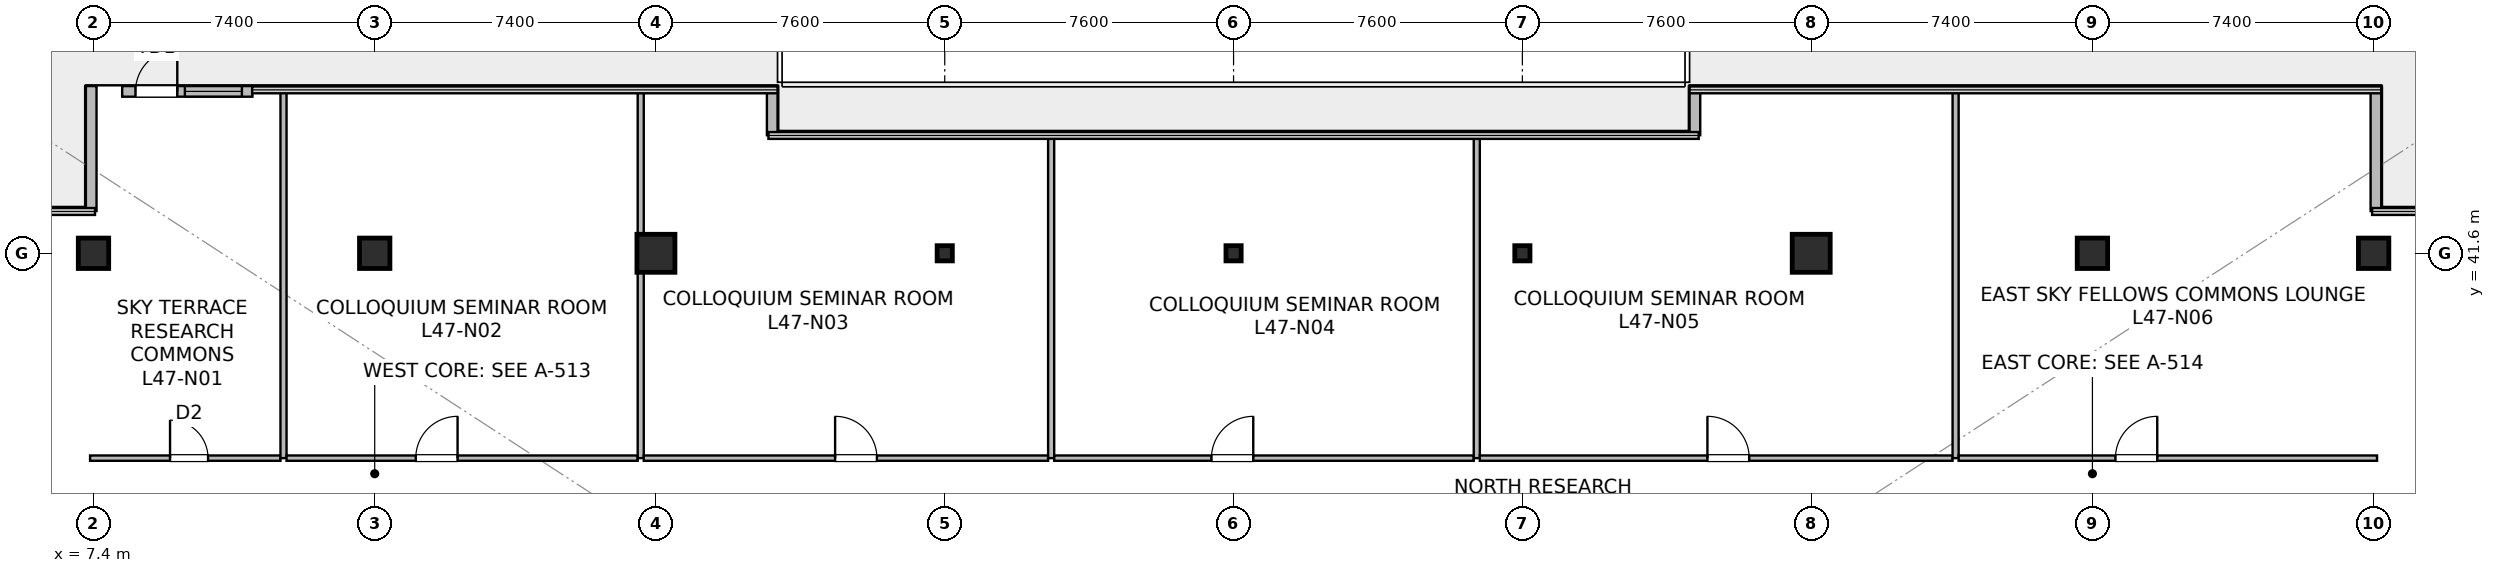
"""IFC4 building model, lengths in metres.
Left out: names, types, materials, properties, quantities, classifications, styles, units other than length and angle.
Written with IfcOpenShell. Run it as: python <this file> out.ifc"""

import sys

from ifc_helpers import new_model, si_unit, direction, frame, frame_2d, origin, origin_2d, place, context, subcontext, project, spatial, rectangle, hollow_rectangle, extrude, source, transform, mapped, element, fill, save


model = new_model("IFC4")
c1 = context("Model", 3, precision=1e-05, world=origin(), true_north=direction((0.0, 1.0)))
c2 = subcontext(c1, "Body", "Model", "MODEL_VIEW")
j1 = project(units=[si_unit("LENGTHUNIT", "METRE"), si_unit("PLANEANGLEUNIT", "RADIAN")], contexts=[c1])
p1 = place(None, origin())
s1 = spatial("IfcSite", under=j1, at=p1, CompositionType="ELEMENT")
p2 = place(p1, origin())
s2 = spatial("IfcBuilding", under=s1, at=p2, CompositionType="ELEMENT")
p3 = place(p2, frame((0.0, 0.0, 196.6)))
s3 = spatial("IfcBuildingStorey", under=s2, at=p3, CompositionType="ELEMENT", Elevation=196.6)
m1 = source(origin(), c2, "Body", "SweptSolid", [
    extrude(rectangle(XDim=0.8, YDim=0.8, at=origin_2d()), origin(), (0.0, 0.0, 1.0), 4.8),
])
p4 = place(p3, frame((14.8, 41.6, 0.0), z_axis=(0.0, 0.0, 1.0), x_axis=(1.0, 0.0, 0.0)))
e1 = element("IfcColumn", 1, at=p4, inside=s3, PredefinedType="COLUMN", context=c2, shape_type="MappedRepresentation", body=[
    mapped(m1, transform((0.0, 0.0, 0.0), scale=1.0)),
])
m2 = source(origin(), c2, "Body", "SweptSolid", [
    extrude(rectangle(XDim=1.0, YDim=1.0, at=origin_2d()), origin(), (0.0, 0.0, 1.0), 4.8),
])
for number, where, z_axis, x_axis in (
    (2, (22.2, 41.6, 0.0), (0.0, 0.0, 1.0), (1.0, 0.0, 0.0)),
    (3, (52.6, 41.6, 0.0), (0.0, 0.0, 1.0), (1.0, 0.0, 0.0)),
):
    element("IfcColumn", number, at=place(p3, frame(where, z_axis=z_axis, x_axis=x_axis)), inside=s3, PredefinedType="COLUMN", context=c2, shape_type="MappedRepresentation", body=[
        mapped(m2, transform((0.0, 0.0, 0.0), scale=1.0)),
    ])
for number, where, z_axis, x_axis in (
    (4, (60.0, 41.6, 0.0), (0.0, 0.0, 1.0), (1.0, 0.0, 0.0)),
    (5, (7.4, 41.6, 0.0), (0.0, 0.0, 1.0), (1.0, 0.0, 0.0)),
    (6, (67.4, 41.6, 0.0), (0.0, 0.0, 1.0), (1.0, 0.0, 0.0)),
):
    element("IfcColumn", number, at=place(p3, frame(where, z_axis=z_axis, x_axis=x_axis)), inside=s3, PredefinedType="COLUMN", context=c2, shape_type="MappedRepresentation", body=[
        mapped(m1, transform((0.0, 0.0, 0.0), scale=1.0)),
    ])
m3 = source(origin(), c2, "Body", "SweptSolid", [
    extrude(hollow_rectangle(XDim=0.4, YDim=0.4, WallThickness=0.019, at=origin_2d()), origin(), (0.0, 0.0, 1.0), 4.8),
])
for number, where, z_axis, x_axis in (
    (7, (29.8, 41.6, 0.0), (0.0, 0.0, 1.0), (1.0, 0.0, 0.0)),
    (8, (37.4, 41.6, 0.0), (0.0, 0.0, 1.0), (1.0, 0.0, 0.0)),
    (9, (45.0, 41.6, 0.0), (0.0, 0.0, 1.0), (1.0, 0.0, 0.0)),
):
    element("IfcColumn", number, at=place(p3, frame(where, z_axis=z_axis, x_axis=x_axis)), inside=s3, PredefinedType="COLUMN", context=c2, shape_type="MappedRepresentation", body=[
        mapped(m3, transform((0.0, 0.0, 0.0), scale=1.0)),
    ])
p5 = place(p3, frame((8.155, 45.86, 0.0), z_axis=(0.0, 0.0, 1.0), x_axis=(1.0, 0.0, 0.0)))
e10 = element("IfcWall", 10, at=p5, inside=s3, PredefinedType="STANDARD", context=c2, shape_type="SweptSolid", body=[
    extrude(rectangle(XDim=3.428, YDim=0.28, at=frame_2d((1.714, 0.0))), origin(), (0.0, 0.0, 1.0), 4.5),
])
p6 = place(p5, frame((0.35, 0.0, 0.0)))
e11 = element("IfcOpeningElement", 11, at=p6, cuts=e10, PredefinedType="OPENING", context=c2, shape_type="SweptSolid", body=[
    extrude(rectangle(XDim=1.1, YDim=2.2, at=frame_2d((0.55, 1.1))), frame((0.0, 0.15, 0.0), z_axis=(0.0, -1.0, 0.0), x_axis=(1.0, 0.0, 0.0)), (0.0, 0.0, 1.0), 0.3),
])
p7 = place(p5, frame((1.65, 0.0, 0.9)))
e12 = element("IfcOpeningElement", 12, at=p7, cuts=e10, PredefinedType="OPENING", context=c2, shape_type="SweptSolid", body=[
    extrude(rectangle(XDim=1.5, YDim=2.2, at=frame_2d((0.75, 1.1))), frame((0.0, 0.15, 0.0), z_axis=(0.0, -1.0, 0.0), x_axis=(1.0, 0.0, 0.0)), (0.0, 0.0, 1.0), 0.3),
])
p8 = place(p3, frame((67.46, 42.712, 0.0), z_axis=(0.0, 0.0, 1.0), x_axis=(0.0, 1.0, 0.0)))
e13 = element("IfcWall", 13, at=p8, inside=s3, PredefinedType="STANDARD", context=c2, shape_type="SweptSolid", body=[
    extrude(rectangle(XDim=3.288, YDim=0.28, at=frame_2d((1.644, 0.0))), origin(), (0.0, 0.0, 1.0), 4.5),
])
for number, where, z_axis, x_axis in (
    (14, (49.54, 46.0, 0.0), (0.0, 0.0, 1.0), (0.0, -1.0, 0.0)),
    (15, (25.26, 44.707, 0.0), (0.0, 0.0, 1.0), (0.0, 1.0, 0.0)),
):
    element("IfcWall", number, at=place(p3, frame(where, z_axis=z_axis, x_axis=x_axis)), inside=s3, PredefinedType="STANDARD", context=c2, shape_type="SweptSolid", body=[
        extrude(rectangle(XDim=1.293, YDim=0.28, at=frame_2d((0.646, 0.0))), origin(), (0.0, 0.0, 1.0), 4.5),
    ])
p9 = place(p3, frame((7.34, 46.0, 0.0), z_axis=(0.0, 0.0, 1.0), x_axis=(0.0, -1.0, 0.0)))
e16 = element("IfcWall", 16, at=p9, inside=s3, PredefinedType="STANDARD", context=c2, shape_type="SweptSolid", body=[
    extrude(rectangle(XDim=3.288, YDim=0.28, at=frame_2d((1.644, 0.0))), origin(), (0.0, 0.0, 1.0), 4.5),
])
p10 = place(p3, frame((7.31, 36.21, 0.0), z_axis=(0.0, 0.0, 1.0), x_axis=(1.0, 0.0, 0.0)))
e17 = element("IfcWall", 17, at=p10, inside=s3, PredefinedType="PARTITIONING", context=c2, shape_type="SweptSolid", body=[
    extrude(rectangle(XDim=5.01, YDim=0.14, at=frame_2d((2.505, 0.0))), origin(), (0.0, 0.0, 1.0), 4.035),
])
p11 = place(p10, frame((2.104, 0.0, 0.0)))
e18 = element("IfcOpeningElement", 18, at=p11, cuts=e17, PredefinedType="OPENING", context=c2, shape_type="SweptSolid", body=[
    extrude(rectangle(XDim=1.0, YDim=2.15, at=frame_2d((0.5, 1.075))), frame((0.0, 0.08, 0.0), z_axis=(0.0, -1.0, 0.0), x_axis=(1.0, 0.0, 0.0)), (0.0, 0.0, 1.0), 0.16),
])
p12 = place(p3, frame((12.4, 36.21, 0.0), z_axis=(0.0, 0.0, 1.0), x_axis=(0.0, 1.0, 0.0)))
e19 = element("IfcWall", 19, at=p12, inside=s3, PredefinedType="PARTITIONING", context=c2, shape_type="SweptSolid", body=[
    extrude(rectangle(XDim=9.68, YDim=0.16, at=frame_2d((4.84, 0.0))), origin(), (0.0, 0.0, 1.0), 3.835),
])
p13 = place(p3, frame((12.48, 36.21, 0.0), z_axis=(0.0, 0.0, 1.0), x_axis=(1.0, 0.0, 0.0)))
e20 = element("IfcWall", 20, at=p13, inside=s3, PredefinedType="PARTITIONING", context=c2, shape_type="SweptSolid", body=[
    extrude(rectangle(XDim=9.24, YDim=0.14, at=frame_2d((4.62, 0.0))), origin(), (0.0, 0.0, 1.0), 3.897),
])
p14 = place(p13, frame((3.4, 0.0, 0.0)))
e21 = element("IfcOpeningElement", 21, at=p14, cuts=e20, PredefinedType="OPENING", context=c2, shape_type="SweptSolid", body=[
    extrude(rectangle(XDim=1.1, YDim=2.18, at=frame_2d((0.55, 1.09))), frame((0.0, 0.08, 0.0), z_axis=(0.0, -1.0, 0.0), x_axis=(1.0, 0.0, 0.0)), (0.0, 0.0, 1.0), 0.16),
])
p15 = place(p3, frame((21.8, 36.21, 0.0), z_axis=(0.0, 0.0, 1.0), x_axis=(0.0, 1.0, 0.0)))
e22 = element("IfcWall", 22, at=p15, inside=s3, PredefinedType="PARTITIONING", context=c2, shape_type="SweptSolid", body=[
    extrude(rectangle(XDim=9.68, YDim=0.16, at=frame_2d((4.84, 0.0))), origin(), (0.0, 0.0, 1.0), 3.835),
])
p16 = place(p3, frame((21.88, 36.21, 0.0), z_axis=(0.0, 0.0, 1.0), x_axis=(1.0, 0.0, 0.0)))
e23 = element("IfcWall", 23, at=p16, inside=s3, PredefinedType="PARTITIONING", context=c2, shape_type="SweptSolid", body=[
    extrude(rectangle(XDim=10.64, YDim=0.14, at=frame_2d((5.32, 0.0))), origin(), (0.0, 0.0, 1.0), 3.897),
])
p17 = place(p16, frame((5.035, 0.0, 0.0)))
e24 = element("IfcOpeningElement", 24, at=p17, cuts=e23, PredefinedType="OPENING", context=c2, shape_type="SweptSolid", body=[
    extrude(rectangle(XDim=1.1, YDim=2.18, at=frame_2d((0.55, 1.09))), frame((0.0, 0.08, 0.0), z_axis=(0.0, -1.0, 0.0), x_axis=(1.0, 0.0, 0.0)), (0.0, 0.0, 1.0), 0.16),
])
p18 = place(p3, frame((32.6, 36.21, 0.0), z_axis=(0.0, 0.0, 1.0), x_axis=(0.0, 1.0, 0.0)))
e25 = element("IfcWall", 25, at=p18, inside=s3, PredefinedType="PARTITIONING", context=c2, shape_type="SweptSolid", body=[
    extrude(rectangle(XDim=8.48, YDim=0.16, at=frame_2d((4.24, 0.0))), origin(), (0.0, 0.0, 1.0), 3.835),
])
p19 = place(p3, frame((32.68, 36.21, 0.0), z_axis=(0.0, 0.0, 1.0), x_axis=(1.0, 0.0, 0.0)))
e26 = element("IfcWall", 26, at=p19, inside=s3, PredefinedType="PARTITIONING", context=c2, shape_type="SweptSolid", body=[
    extrude(rectangle(XDim=11.04, YDim=0.14, at=frame_2d((5.52, 0.0))), origin(), (0.0, 0.0, 1.0), 3.897),
])
p20 = place(p19, frame((4.138, 0.0, 0.0)))
e27 = element("IfcOpeningElement", 27, at=p20, cuts=e26, PredefinedType="OPENING", context=c2, shape_type="SweptSolid", body=[
    extrude(rectangle(XDim=1.1, YDim=2.18, at=frame_2d((0.55, 1.09))), frame((0.0, 0.08, 0.0), z_axis=(0.0, -1.0, 0.0), x_axis=(1.0, 0.0, 0.0)), (0.0, 0.0, 1.0), 0.16),
])
p21 = place(p3, frame((43.8, 36.21, 0.0), z_axis=(0.0, 0.0, 1.0), x_axis=(0.0, 1.0, 0.0)))
e28 = element("IfcWall", 28, at=p21, inside=s3, PredefinedType="PARTITIONING", context=c2, shape_type="SweptSolid", body=[
    extrude(rectangle(XDim=8.48, YDim=0.16, at=frame_2d((4.24, 0.0))), origin(), (0.0, 0.0, 1.0), 3.835),
])
p22 = place(p3, frame((43.88, 36.21, 0.0), z_axis=(0.0, 0.0, 1.0), x_axis=(1.0, 0.0, 0.0)))
e29 = element("IfcWall", 29, at=p22, inside=s3, PredefinedType="PARTITIONING", context=c2, shape_type="SweptSolid", body=[
    extrude(rectangle(XDim=12.44, YDim=0.14, at=frame_2d((6.22, 0.0))), origin(), (0.0, 0.0, 1.0), 3.897),
])
p23 = place(p22, frame((5.989, 0.0, 0.0)))
e30 = element("IfcOpeningElement", 30, at=p23, cuts=e29, PredefinedType="OPENING", context=c2, shape_type="SweptSolid", body=[
    extrude(rectangle(XDim=1.1, YDim=2.18, at=frame_2d((0.55, 1.09))), frame((0.0, 0.08, 0.0), z_axis=(0.0, -1.0, 0.0), x_axis=(1.0, 0.0, 0.0)), (0.0, 0.0, 1.0), 0.16),
])
p24 = place(p3, frame((56.4, 36.21, 0.0), z_axis=(0.0, 0.0, 1.0), x_axis=(0.0, 1.0, 0.0)))
e31 = element("IfcWall", 31, at=p24, inside=s3, PredefinedType="PARTITIONING", context=c2, shape_type="SweptSolid", body=[
    extrude(rectangle(XDim=9.68, YDim=0.16, at=frame_2d((4.84, 0.0))), origin(), (0.0, 0.0, 1.0), 3.835),
])
p25 = place(p3, frame((56.48, 36.21, 0.0), z_axis=(0.0, 0.0, 1.0), x_axis=(1.0, 0.0, 0.0)))
e32 = element("IfcWall", 32, at=p25, inside=s3, PredefinedType="PARTITIONING", context=c2, shape_type="SweptSolid", body=[
    extrude(rectangle(XDim=11.01, YDim=0.14, at=frame_2d((5.505, 0.0))), origin(), (0.0, 0.0, 1.0), 3.897),
])
p26 = place(p25, frame((4.126, 0.0, 0.0)))
e33 = element("IfcOpeningElement", 33, at=p26, cuts=e32, PredefinedType="OPENING", context=c2, shape_type="SweptSolid", body=[
    extrude(rectangle(XDim=1.1, YDim=2.18, at=frame_2d((0.55, 1.09))), frame((0.0, 0.08, 0.0), z_axis=(0.0, -1.0, 0.0), x_axis=(1.0, 0.0, 0.0)), (0.0, 0.0, 1.0), 0.16),
])
m4 = source(origin(), c2, "Body", "SweptSolid", [
    extrude(rectangle(XDim=1.1, YDim=2.2, at=frame_2d((0.55, 1.1))), frame((0.0, 0.025, 0.0), z_axis=(0.0, -1.0, 0.0), x_axis=(1.0, 0.0, 0.0)), (0.0, 0.0, 1.0), 0.05),
])
p27 = place(p6, origin())
e34 = element("IfcDoor", 34, at=p27, inside=s3, OperationType="SINGLE_SWING_RIGHT", PredefinedType="DOOR", context=c2, shape_type="MappedRepresentation", body=[
    mapped(m4, transform((0.0, 0.0, 0.0), scale=1.0)),
])
fill(e11, e34)
m5 = source(origin(), c2, "Body", "SweptSolid", [
    extrude(rectangle(XDim=1.5, YDim=2.2, at=frame_2d((0.75, 1.1))), frame((0.0, 0.03, 0.0), z_axis=(0.0, -1.0, 0.0), x_axis=(1.0, 0.0, 0.0)), (0.0, 0.0, 1.0), 0.06),
])
p28 = place(p7, origin())
e35 = element("IfcWindow", 35, at=p28, inside=s3, PartitioningType="SINGLE_PANEL", PredefinedType="WINDOW", context=c2, shape_type="MappedRepresentation", body=[
    mapped(m5, transform((0.0, 0.0, 0.0), scale=1.0)),
])
fill(e12, e35)
m6 = source(origin(), c2, "Body", "SweptSolid", [
    extrude(rectangle(XDim=1.0, YDim=2.15, at=frame_2d((0.5, 1.075))), frame((0.0, 0.025, 0.0), z_axis=(0.0, -1.0, 0.0), x_axis=(1.0, 0.0, 0.0)), (0.0, 0.0, 1.0), 0.05),
])
p29 = place(p11, origin())
e36 = element("IfcDoor", 36, at=p29, inside=s3, OperationType="SINGLE_SWING_LEFT", PredefinedType="DOOR", context=c2, shape_type="MappedRepresentation", body=[
    mapped(m6, transform((0.0, 0.0, 0.0), scale=1.0)),
])
fill(e18, e36)
m7 = source(origin(), c2, "Body", "SweptSolid", [
    extrude(rectangle(XDim=1.1, YDim=2.18, at=frame_2d((0.55, 1.09))), frame((0.0, 0.025, 0.0), z_axis=(0.0, -1.0, 0.0), x_axis=(1.0, 0.0, 0.0)), (0.0, 0.0, 1.0), 0.05),
])
p30 = place(p14, origin())
e37 = element("IfcDoor", 37, at=p30, inside=s3, OperationType="SINGLE_SWING_RIGHT", PredefinedType="DOOR", context=c2, shape_type="MappedRepresentation", body=[
    mapped(m7, transform((0.0, 0.0, 0.0), scale=1.0)),
])
fill(e21, e37)
p31 = place(p17, origin())
e38 = element("IfcDoor", 38, at=p31, inside=s3, OperationType="SINGLE_SWING_LEFT", PredefinedType="DOOR", context=c2, shape_type="MappedRepresentation", body=[
    mapped(m7, transform((0.0, 0.0, 0.0), scale=1.0)),
])
fill(e24, e38)
p32 = place(p20, origin())
e39 = element("IfcDoor", 39, at=p32, inside=s3, OperationType="SINGLE_SWING_RIGHT", PredefinedType="DOOR", context=c2, shape_type="MappedRepresentation", body=[
    mapped(m7, transform((0.0, 0.0, 0.0), scale=1.0)),
])
fill(e27, e39)
p33 = place(p23, origin())
e40 = element("IfcDoor", 40, at=p33, inside=s3, OperationType="SINGLE_SWING_LEFT", PredefinedType="DOOR", context=c2, shape_type="MappedRepresentation", body=[
    mapped(m7, transform((0.0, 0.0, 0.0), scale=1.0)),
])
fill(e30, e40)
p34 = place(p26, origin())
e41 = element("IfcDoor", 41, at=p34, inside=s3, OperationType="SINGLE_SWING_RIGHT", PredefinedType="DOOR", context=c2, shape_type="MappedRepresentation", body=[
    mapped(m7, transform((0.0, 0.0, 0.0), scale=1.0)),
])
fill(e33, e41)
save(model, sys.argv[1])
